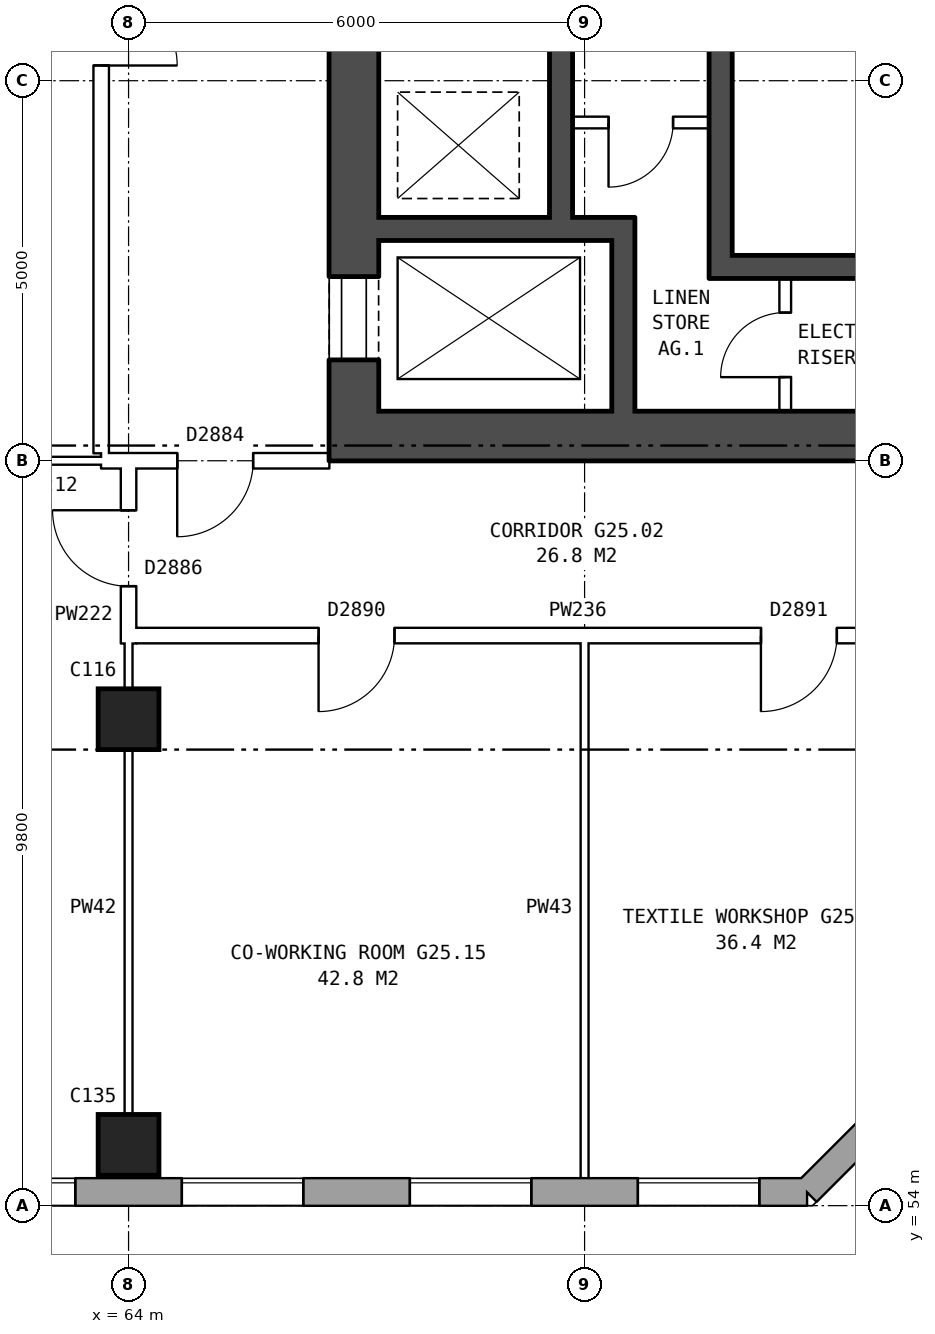
"""IFC4 building model, lengths in metres.
Left out: names, types, materials, properties, quantities, classifications, styles, units other than length and angle.
Written with IfcOpenShell. Run it as: python <this file> out.ifc"""

import sys

from ifc_helpers import new_model, si_unit, direction, frame, frame_2d, origin, origin_2d, place, context, subcontext, project, spatial, rectangle, extrude, element, fill, save


model = new_model("IFC4")
c1 = context("Model", 3, precision=1e-05, world=origin(), true_north=direction((0.0, 1.0)))
c2 = subcontext(c1, "Body", "Model", "MODEL_VIEW")
j1 = project(units=[si_unit("LENGTHUNIT", "METRE"), si_unit("PLANEANGLEUNIT", "RADIAN")], contexts=[c1])
p1 = place(None, origin())
s1 = spatial("IfcSite", under=j1, at=p1, CompositionType="ELEMENT")
p2 = place(p1, origin())
s2 = spatial("IfcBuilding", under=s1, at=p2, CompositionType="ELEMENT")
p3 = place(p2, frame((0.0, 0.0, 90.2)))
s3 = spatial("IfcBuildingStorey", under=s2, at=p3, CompositionType="ELEMENT", Elevation=90.2)
for number, where, z_axis, x_axis in (
    (1, (64.0, 54.8, 0.0), (0.0, 0.0, 1.0), (1.0, 0.0, 0.0)),
    (2, (64.0, 60.4, 0.0), (0.0, 0.0, 1.0), (1.0, 0.0, 0.0)),
):
    element("IfcColumn", number, at=place(p3, frame(where, z_axis=z_axis, x_axis=x_axis)), inside=s3, PredefinedType="COLUMN", context=c2, shape_type="SweptSolid", body=[
        extrude(rectangle(XDim=0.8, YDim=0.8, at=origin_2d()), origin(), (0.0, 0.0, 1.0), 5.6),
    ])
p4 = place(p3, frame((28.075, 54.18, 0.0), z_axis=(0.0, 0.0, 1.0), x_axis=(1.0, 0.0, 0.0)))
e3 = element("IfcWall", 3, at=p4, inside=s3, PredefinedType="STANDARD", context=c2, shape_type="SweptSolid", body=[
    extrude(rectangle(XDim=44.851, YDim=0.36, at=frame_2d((22.425, 0.0))), origin(), (0.0, 0.0, 1.0), 5.6),
])
p5 = place(p4, frame((0.625, 0.0, 0.15)))
e4 = element("IfcOpeningElement", 4, at=p5, cuts=e3, PredefinedType="OPENING", context=c2, shape_type="SweptSolid", body=[
    extrude(rectangle(XDim=1.6, YDim=2.4, at=frame_2d((0.8, 1.2))), frame((0.0, 0.19, 0.0), z_axis=(0.0, -1.0, 0.0), x_axis=(1.0, 0.0, 0.0)), (0.0, 0.0, 1.0), 0.38),
])
p6 = place(p4, frame((3.625, 0.0, 0.15)))
e5 = element("IfcOpeningElement", 5, at=p6, cuts=e3, PredefinedType="OPENING", context=c2, shape_type="SweptSolid", body=[
    extrude(rectangle(XDim=1.6, YDim=2.4, at=frame_2d((0.8, 1.2))), frame((0.0, 0.19, 0.0), z_axis=(0.0, -1.0, 0.0), x_axis=(1.0, 0.0, 0.0)), (0.0, 0.0, 1.0), 0.38),
])
p7 = place(p4, frame((6.625, 0.0, 0.15)))
e6 = element("IfcOpeningElement", 6, at=p7, cuts=e3, PredefinedType="OPENING", context=c2, shape_type="SweptSolid", body=[
    extrude(rectangle(XDim=1.6, YDim=2.4, at=frame_2d((0.8, 1.2))), frame((0.0, 0.19, 0.0), z_axis=(0.0, -1.0, 0.0), x_axis=(1.0, 0.0, 0.0)), (0.0, 0.0, 1.0), 0.38),
])
p8 = place(p4, frame((9.625, 0.0, 0.15)))
e7 = element("IfcOpeningElement", 7, at=p8, cuts=e3, PredefinedType="OPENING", context=c2, shape_type="SweptSolid", body=[
    extrude(rectangle(XDim=1.6, YDim=2.4, at=frame_2d((0.8, 1.2))), frame((0.0, 0.19, 0.0), z_axis=(0.0, -1.0, 0.0), x_axis=(1.0, 0.0, 0.0)), (0.0, 0.0, 1.0), 0.38),
])
p9 = place(p4, frame((12.625, 0.0, 0.15)))
e8 = element("IfcOpeningElement", 8, at=p9, cuts=e3, PredefinedType="OPENING", context=c2, shape_type="SweptSolid", body=[
    extrude(rectangle(XDim=1.6, YDim=2.4, at=frame_2d((0.8, 1.2))), frame((0.0, 0.19, 0.0), z_axis=(0.0, -1.0, 0.0), x_axis=(1.0, 0.0, 0.0)), (0.0, 0.0, 1.0), 0.38),
])
p10 = place(p4, frame((15.625, 0.0, 0.15)))
e9 = element("IfcOpeningElement", 9, at=p10, cuts=e3, PredefinedType="OPENING", context=c2, shape_type="SweptSolid", body=[
    extrude(rectangle(XDim=1.6, YDim=2.4, at=frame_2d((0.8, 1.2))), frame((0.0, 0.19, 0.0), z_axis=(0.0, -1.0, 0.0), x_axis=(1.0, 0.0, 0.0)), (0.0, 0.0, 1.0), 0.38),
])
p11 = place(p4, frame((18.625, 0.0, 0.15)))
e10 = element("IfcOpeningElement", 10, at=p11, cuts=e3, PredefinedType="OPENING", context=c2, shape_type="SweptSolid", body=[
    extrude(rectangle(XDim=1.6, YDim=2.4, at=frame_2d((0.8, 1.2))), frame((0.0, 0.19, 0.0), z_axis=(0.0, -1.0, 0.0), x_axis=(1.0, 0.0, 0.0)), (0.0, 0.0, 1.0), 0.38),
])
p12 = place(p4, frame((21.625, 0.0, 0.15)))
e11 = element("IfcOpeningElement", 11, at=p12, cuts=e3, PredefinedType="OPENING", context=c2, shape_type="SweptSolid", body=[
    extrude(rectangle(XDim=1.6, YDim=2.4, at=frame_2d((0.8, 1.2))), frame((0.0, 0.19, 0.0), z_axis=(0.0, -1.0, 0.0), x_axis=(1.0, 0.0, 0.0)), (0.0, 0.0, 1.0), 0.38),
])
p13 = place(p4, frame((24.625, 0.0, 0.15)))
e12 = element("IfcOpeningElement", 12, at=p13, cuts=e3, PredefinedType="OPENING", context=c2, shape_type="SweptSolid", body=[
    extrude(rectangle(XDim=1.6, YDim=2.4, at=frame_2d((0.8, 1.2))), frame((0.0, 0.19, 0.0), z_axis=(0.0, -1.0, 0.0), x_axis=(1.0, 0.0, 0.0)), (0.0, 0.0, 1.0), 0.38),
])
p14 = place(p4, frame((27.625, 0.0, 0.15)))
e13 = element("IfcOpeningElement", 13, at=p14, cuts=e3, PredefinedType="OPENING", context=c2, shape_type="SweptSolid", body=[
    extrude(rectangle(XDim=1.6, YDim=2.4, at=frame_2d((0.8, 1.2))), frame((0.0, 0.19, 0.0), z_axis=(0.0, -1.0, 0.0), x_axis=(1.0, 0.0, 0.0)), (0.0, 0.0, 1.0), 0.38),
])
p15 = place(p4, frame((30.625, 0.0, 0.15)))
e14 = element("IfcOpeningElement", 14, at=p15, cuts=e3, PredefinedType="OPENING", context=c2, shape_type="SweptSolid", body=[
    extrude(rectangle(XDim=1.6, YDim=2.4, at=frame_2d((0.8, 1.2))), frame((0.0, 0.19, 0.0), z_axis=(0.0, -1.0, 0.0), x_axis=(1.0, 0.0, 0.0)), (0.0, 0.0, 1.0), 0.38),
])
p16 = place(p4, frame((33.625, 0.0, 0.15)))
e15 = element("IfcOpeningElement", 15, at=p16, cuts=e3, PredefinedType="OPENING", context=c2, shape_type="SweptSolid", body=[
    extrude(rectangle(XDim=1.6, YDim=2.4, at=frame_2d((0.8, 1.2))), frame((0.0, 0.19, 0.0), z_axis=(0.0, -1.0, 0.0), x_axis=(1.0, 0.0, 0.0)), (0.0, 0.0, 1.0), 0.38),
])
p17 = place(p4, frame((36.625, 0.0, 0.15)))
e16 = element("IfcOpeningElement", 16, at=p17, cuts=e3, PredefinedType="OPENING", context=c2, shape_type="SweptSolid", body=[
    extrude(rectangle(XDim=1.6, YDim=2.4, at=frame_2d((0.8, 1.2))), frame((0.0, 0.19, 0.0), z_axis=(0.0, -1.0, 0.0), x_axis=(1.0, 0.0, 0.0)), (0.0, 0.0, 1.0), 0.38),
])
p18 = place(p4, frame((39.625, 0.0, 0.15)))
e17 = element("IfcOpeningElement", 17, at=p18, cuts=e3, PredefinedType="OPENING", context=c2, shape_type="SweptSolid", body=[
    extrude(rectangle(XDim=1.6, YDim=2.4, at=frame_2d((0.8, 1.2))), frame((0.0, 0.19, 0.0), z_axis=(0.0, -1.0, 0.0), x_axis=(1.0, 0.0, 0.0)), (0.0, 0.0, 1.0), 0.38),
])
p19 = place(p4, frame((42.625, 0.0, 0.15)))
e18 = element("IfcOpeningElement", 18, at=p19, cuts=e3, PredefinedType="OPENING", context=c2, shape_type="SweptSolid", body=[
    extrude(rectangle(XDim=1.6, YDim=2.4, at=frame_2d((0.8, 1.2))), frame((0.0, 0.19, 0.0), z_axis=(0.0, -1.0, 0.0), x_axis=(1.0, 0.0, 0.0)), (0.0, 0.0, 1.0), 0.38),
])
p20 = place(p3, frame((72.925, 54.18, 0.0), z_axis=(0.0, 0.0, 1.0), x_axis=(0.707106781187, 0.707106781187, 0.0)))
e19 = element("IfcWall", 19, at=p20, inside=s3, PredefinedType="STANDARD", context=c2, shape_type="SweptSolid", body=[
    extrude(rectangle(XDim=4.094, YDim=0.36, at=frame_2d((2.047, 0.0))), origin(), (0.0, 0.0, 1.0), 5.6),
])
p21 = place(p3, frame((66.965, 64.45, 0.0), z_axis=(0.0, 0.0, 1.0), x_axis=(0.0, 1.0, 0.0)))
e20 = element("IfcWall", 20, at=p21, inside=s3, PredefinedType="SHEAR", context=c2, shape_type="SweptSolid", body=[
    extrude(rectangle(XDim=11.1, YDim=0.65, at=frame_2d((5.55, 0.0))), origin(), (0.0, 0.0, 1.0), 5.6),
])
p22 = place(p21, frame((0.675, 0.0, 0.0)))
e21 = element("IfcOpeningElement", 21, at=p22, cuts=e20, PredefinedType="OPENING", context=c2, shape_type="SweptSolid", body=[
    extrude(rectangle(XDim=1.1, YDim=2.1, at=frame_2d((0.55, 1.05))), frame((0.0, 0.335, 0.0), z_axis=(0.0, -1.0, 0.0), x_axis=(1.0, 0.0, 0.0)), (0.0, 0.0, 1.0), 0.67),
])
p23 = place(p21, frame((9.25, 0.0, 0.0)))
e22 = element("IfcOpeningElement", 22, at=p23, cuts=e20, PredefinedType="OPENING", context=c2, shape_type="SweptSolid", body=[
    extrude(rectangle(XDim=1.1, YDim=2.1, at=frame_2d((0.55, 1.05))), frame((0.0, 0.335, 0.0), z_axis=(0.0, -1.0, 0.0), x_axis=(1.0, 0.0, 0.0)), (0.0, 0.0, 1.0), 0.67),
])
p24 = place(p3, frame((66.64, 64.125, 0.0), z_axis=(0.0, 0.0, 1.0), x_axis=(1.0, 0.0, 0.0)))
e23 = element("IfcWall", 23, at=p24, inside=s3, PredefinedType="SHEAR", context=c2, shape_type="SweptSolid", body=[
    extrude(rectangle(XDim=9.0, YDim=0.65, at=frame_2d((4.5, 0.0))), origin(), (0.0, 0.0, 1.0), 5.6),
])
p25 = place(p3, frame((71.94, 66.35, 0.0), z_axis=(0.0, 0.0, 1.0), x_axis=(1.0, 0.0, 0.0)))
e24 = element("IfcWall", 24, at=p25, inside=s3, PredefinedType="SHEAR", context=c2, shape_type="SweptSolid", body=[
    extrude(rectangle(XDim=3.05, YDim=0.3, at=frame_2d((1.525, 0.0))), origin(), (0.0, 0.0, 1.0), 5.6),
])
p26 = place(p3, frame((67.29, 66.85, 0.0), z_axis=(0.0, 0.0, 1.0), x_axis=(1.0, 0.0, 0.0)))
e25 = element("IfcWall", 25, at=p26, inside=s3, PredefinedType="SHEAR", context=c2, shape_type="SweptSolid", body=[
    extrude(rectangle(XDim=3.37, YDim=0.3, at=frame_2d((1.685, 0.0))), origin(), (0.0, 0.0, 1.0), 5.6),
])
p27 = place(p3, frame((69.84, 68.25, 0.0), z_axis=(0.0, 0.0, 1.0), x_axis=(1.0, 0.0, 0.0)))
e26 = element("IfcWall", 26, at=p27, inside=s3, PredefinedType="PARTITIONING", context=c2, shape_type="SweptSolid", body=[
    extrude(rectangle(XDim=1.8, YDim=0.15, at=frame_2d((0.9, 0.0))), origin(), (0.0, 0.0, 1.0), 5.6),
])
p28 = place(p27, frame((0.475, 0.0, 0.0)))
e27 = element("IfcOpeningElement", 27, at=p28, cuts=e26, PredefinedType="OPENING", context=c2, shape_type="SweptSolid", body=[
    extrude(rectangle(XDim=0.85, YDim=2.1, at=frame_2d((0.425, 1.05))), frame((0.0, 0.085, 0.0), z_axis=(0.0, -1.0, 0.0), x_axis=(1.0, 0.0, 0.0)), (0.0, 0.0, 1.0), 0.17),
])
p29 = place(p3, frame((69.69, 67.0, 0.0), z_axis=(0.0, 0.0, 1.0), x_axis=(0.0, 1.0, 0.0)))
e28 = element("IfcWall", 28, at=p29, inside=s3, PredefinedType="SHEAR", context=c2, shape_type="SweptSolid", body=[
    extrude(rectangle(XDim=6.6, YDim=0.3, at=frame_2d((3.3, 0.0))), origin(), (0.0, 0.0, 1.0), 5.6),
])
p30 = place(p3, frame((70.51, 64.45, 0.0), z_axis=(0.0, 0.0, 1.0), x_axis=(0.0, 1.0, 0.0)))
e29 = element("IfcWall", 29, at=p30, inside=s3, PredefinedType="SHEAR", context=c2, shape_type="SweptSolid", body=[
    extrude(rectangle(XDim=2.25, YDim=0.3, at=frame_2d((1.125, 0.0))), origin(), (0.0, 0.0, 1.0), 5.6),
])
p31 = place(p3, frame((71.79, 66.2, 0.0), z_axis=(0.0, 0.0, 1.0), x_axis=(0.0, 1.0, 0.0)))
e30 = element("IfcWall", 30, at=p31, inside=s3, PredefinedType="SHEAR", context=c2, shape_type="SweptSolid", body=[
    extrude(rectangle(XDim=7.4, YDim=0.3, at=frame_2d((3.7, 0.0))), origin(), (0.0, 0.0, 1.0), 5.6),
])
p32 = place(p3, frame((72.64, 64.45, 0.0), z_axis=(0.0, 0.0, 1.0), x_axis=(0.0, 1.0, 0.0)))
e31 = element("IfcWall", 31, at=p32, inside=s3, PredefinedType="PARTITIONING", context=c2, shape_type="SweptSolid", body=[
    extrude(rectangle(XDim=1.75, YDim=0.15, at=frame_2d((0.875, 0.0))), origin(), (0.0, 0.0, 1.0), 5.6),
])
p33 = place(p32, frame((0.45, 0.0, 0.0)))
e32 = element("IfcOpeningElement", 32, at=p33, cuts=e31, PredefinedType="OPENING", context=c2, shape_type="SweptSolid", body=[
    extrude(rectangle(XDim=0.85, YDim=2.1, at=frame_2d((0.425, 1.05))), frame((0.0, 0.085, 0.0), z_axis=(0.0, -1.0, 0.0), x_axis=(1.0, 0.0, 0.0)), (0.0, 0.0, 1.0), 0.17),
])
p34 = place(p3, frame((63.64, 63.9, 0.0), z_axis=(0.0, 0.0, 1.0), x_axis=(0.0, 1.0, 0.0)))
e33 = element("IfcWall", 33, at=p34, inside=s3, PredefinedType="PARTITIONING", context=c2, shape_type="SweptSolid", body=[
    extrude(rectangle(XDim=12.2, YDim=0.2, at=frame_2d((6.1, 0.0))), origin(), (0.0, 0.0, 1.0), 5.6),
])
p35 = place(p34, frame((5.1, 0.0, 0.0)))
e34 = element("IfcOpeningElement", 34, at=p35, cuts=e33, PredefinedType="OPENING", context=c2, shape_type="SweptSolid", body=[
    extrude(rectangle(XDim=2.0, YDim=2.1, at=frame_2d((1.0, 1.05))), frame((0.0, 0.11, 0.0), z_axis=(0.0, -1.0, 0.0), x_axis=(1.0, 0.0, 0.0)), (0.0, 0.0, 1.0), 0.22),
])
p36 = place(p3, frame((63.9, 61.5, 0.0), z_axis=(0.0, 0.0, 1.0), x_axis=(1.0, 0.0, 0.0)))
e35 = element("IfcWall", 35, at=p36, inside=s3, PredefinedType="PARTITIONING", context=c2, shape_type="SweptSolid", body=[
    extrude(rectangle(XDim=11.86, YDim=0.2, at=frame_2d((5.93, 0.0))), origin(), (0.0, 0.0, 1.0), 5.6),
])
p37 = place(p36, frame((2.6, 0.0, 0.0)))
e36 = element("IfcOpeningElement", 36, at=p37, cuts=e35, PredefinedType="OPENING", context=c2, shape_type="SweptSolid", body=[
    extrude(rectangle(XDim=1.0, YDim=2.1, at=frame_2d((0.5, 1.05))), frame((0.0, 0.11, 0.0), z_axis=(0.0, -1.0, 0.0), x_axis=(1.0, 0.0, 0.0)), (0.0, 0.0, 1.0), 0.22),
])
p38 = place(p36, frame((8.42, 0.0, 0.0)))
e37 = element("IfcOpeningElement", 37, at=p38, cuts=e35, PredefinedType="OPENING", context=c2, shape_type="SweptSolid", body=[
    extrude(rectangle(XDim=1.0, YDim=2.1, at=frame_2d((0.5, 1.05))), frame((0.0, 0.11, 0.0), z_axis=(0.0, -1.0, 0.0), x_axis=(1.0, 0.0, 0.0)), (0.0, 0.0, 1.0), 0.22),
])
p39 = place(p3, frame((63.64, 63.8, 0.0), z_axis=(0.0, 0.0, 1.0), x_axis=(1.0, 0.0, 0.0)))
e38 = element("IfcWall", 38, at=p39, inside=s3, PredefinedType="PARTITIONING", context=c2, shape_type="SweptSolid", body=[
    extrude(rectangle(XDim=3.0, YDim=0.2, at=frame_2d((1.5, 0.0))), origin(), (0.0, 0.0, 1.0), 5.6),
])
p40 = place(p39, frame((1.0, 0.0, 0.0)))
e39 = element("IfcOpeningElement", 39, at=p40, cuts=e38, PredefinedType="OPENING", context=c2, shape_type="SweptSolid", body=[
    extrude(rectangle(XDim=1.0, YDim=2.1, at=frame_2d((0.5, 1.05))), frame((0.0, 0.11, 0.0), z_axis=(0.0, -1.0, 0.0), x_axis=(1.0, 0.0, 0.0)), (0.0, 0.0, 1.0), 0.22),
])
p41 = place(p3, frame((44.26, 63.8, 0.0), z_axis=(0.0, 0.0, 1.0), x_axis=(1.0, 0.0, 0.0)))
e40 = element("IfcWall", 40, at=p41, inside=s3, PredefinedType="PARTITIONING", context=c2, shape_type="SweptSolid", body=[
    extrude(rectangle(XDim=19.38, YDim=0.1, at=frame_2d((9.69, 0.0))), origin(), (0.0, 0.0, 1.0), 5.6),
])
p42 = place(p41, frame((4.42, 0.0, 0.0)))
e41 = element("IfcOpeningElement", 41, at=p42, cuts=e40, PredefinedType="OPENING", context=c2, shape_type="SweptSolid", body=[
    extrude(rectangle(XDim=1.0, YDim=2.1, at=frame_2d((0.5, 1.05))), frame((0.0, 0.06, 0.0), z_axis=(0.0, -1.0, 0.0), x_axis=(1.0, 0.0, 0.0)), (0.0, 0.0, 1.0), 0.12),
])
p43 = place(p41, frame((14.06, 0.0, 0.0)))
e42 = element("IfcOpeningElement", 42, at=p43, cuts=e40, PredefinedType="OPENING", context=c2, shape_type="SweptSolid", body=[
    extrude(rectangle(XDim=1.0, YDim=2.1, at=frame_2d((0.5, 1.05))), frame((0.0, 0.06, 0.0), z_axis=(0.0, -1.0, 0.0), x_axis=(1.0, 0.0, 0.0)), (0.0, 0.0, 1.0), 0.12),
])
p44 = place(p3, frame((64.0, 61.398, 0.0), z_axis=(0.0, 0.0, 1.0), x_axis=(0.0, 1.0, 0.0)))
e43 = element("IfcWall", 43, at=p44, inside=s3, PredefinedType="PARTITIONING", context=c2, shape_type="SweptSolid", body=[
    extrude(rectangle(XDim=2.502, YDim=0.2, at=frame_2d((1.251, 0.0))), origin(), (0.0, 0.0, 1.0), 5.6),
])
p45 = place(p44, frame((0.751, 0.0, 0.0)))
e44 = element("IfcOpeningElement", 44, at=p45, cuts=e43, PredefinedType="OPENING", context=c2, shape_type="SweptSolid", body=[
    extrude(rectangle(XDim=1.0, YDim=2.1, at=frame_2d((0.5, 1.05))), frame((0.0, 0.11, 0.0), z_axis=(0.0, -1.0, 0.0), x_axis=(1.0, 0.0, 0.0)), (0.0, 0.0, 1.0), 0.22),
])
p46 = place(p3, frame((64.0, 54.24, 0.0), z_axis=(0.0, 0.0, 1.0), x_axis=(0.0, 1.0, 0.0)))
e45 = element("IfcWall", 45, at=p46, inside=s3, PredefinedType="PARTITIONING", context=c2, shape_type="SweptSolid", body=[
    extrude(rectangle(XDim=7.362, YDim=0.1, at=frame_2d((3.681, 0.0))), origin(), (0.0, 0.0, 1.0), 5.6),
])
p47 = place(p3, frame((70.0, 54.24, 0.0), z_axis=(0.0, 0.0, 1.0), x_axis=(0.0, 1.0, 0.0)))
e46 = element("IfcWall", 46, at=p47, inside=s3, PredefinedType="PARTITIONING", context=c2, shape_type="SweptSolid", body=[
    extrude(rectangle(XDim=7.36, YDim=0.1, at=frame_2d((3.68, 0.0))), origin(), (0.0, 0.0, 1.0), 5.6),
])
p48 = place(p16, origin())
e47 = element("IfcWindow", 47, at=p48, inside=s3, PartitioningType="SINGLE_PANEL", PredefinedType="WINDOW", context=c2, shape_type="SweptSolid", body=[
    extrude(rectangle(XDim=1.6, YDim=2.4, at=frame_2d((0.8, 1.2))), frame((0.0, 0.15, 0.0), z_axis=(0.0, -1.0, 0.0), x_axis=(1.0, 0.0, 0.0)), (0.0, 0.0, 1.0), 0.06),
])
fill(e15, e47)
p49 = place(p17, origin())
e48 = element("IfcWindow", 48, at=p49, inside=s3, PartitioningType="SINGLE_PANEL", PredefinedType="WINDOW", context=c2, shape_type="SweptSolid", body=[
    extrude(rectangle(XDim=1.6, YDim=2.4, at=frame_2d((0.8, 1.2))), frame((0.0, 0.15, 0.0), z_axis=(0.0, -1.0, 0.0), x_axis=(1.0, 0.0, 0.0)), (0.0, 0.0, 1.0), 0.06),
])
fill(e16, e48)
p50 = place(p18, origin())
e49 = element("IfcWindow", 49, at=p50, inside=s3, PartitioningType="SINGLE_PANEL", PredefinedType="WINDOW", context=c2, shape_type="SweptSolid", body=[
    extrude(rectangle(XDim=1.6, YDim=2.4, at=frame_2d((0.8, 1.2))), frame((0.0, 0.15, 0.0), z_axis=(0.0, -1.0, 0.0), x_axis=(1.0, 0.0, 0.0)), (0.0, 0.0, 1.0), 0.06),
])
fill(e17, e49)
p51 = place(p19, origin())
e50 = element("IfcWindow", 50, at=p51, inside=s3, PartitioningType="SINGLE_PANEL", PredefinedType="WINDOW", context=c2, shape_type="SweptSolid", body=[
    extrude(rectangle(XDim=1.6, YDim=2.4, at=frame_2d((0.8, 1.2))), frame((0.0, 0.15, 0.0), z_axis=(0.0, -1.0, 0.0), x_axis=(1.0, 0.0, 0.0)), (0.0, 0.0, 1.0), 0.06),
])
fill(e18, e50)
p52 = place(p22, origin())
e51 = element("IfcDoor", 51, at=p52, inside=s3, OperationType="DOUBLE_DOOR_SLIDING", PredefinedType="DOOR", context=c2, shape_type="SweptSolid", body=[
    extrude(rectangle(XDim=1.1, YDim=2.1, at=frame_2d((0.55, 1.05))), frame((0.0, -0.26, 0.0), z_axis=(0.0, -1.0, 0.0), x_axis=(1.0, 0.0, 0.0)), (0.0, 0.0, 1.0), 0.05),
])
fill(e21, e51)
p53 = place(p28, frame((0.85, 0.0, 0.0), z_axis=(0.0, 0.0, 1.0), x_axis=(-1.0, 0.0, 0.0)))
e52 = element("IfcDoor", 52, at=p53, inside=s3, OperationType="SINGLE_SWING_RIGHT", PredefinedType="DOOR", context=c2, shape_type="SweptSolid", body=[
    extrude(rectangle(XDim=0.85, YDim=2.1, at=frame_2d((0.425, 1.05))), frame((0.0, 0.025, 0.0), z_axis=(0.0, -1.0, 0.0), x_axis=(1.0, 0.0, 0.0)), (0.0, 0.0, 1.0), 0.05),
])
fill(e27, e52)
p54 = place(p33, origin())
e53 = element("IfcDoor", 53, at=p54, inside=s3, OperationType="SINGLE_SWING_LEFT", PredefinedType="DOOR", context=c2, shape_type="SweptSolid", body=[
    extrude(rectangle(XDim=0.85, YDim=2.1, at=frame_2d((0.425, 1.05))), frame((0.0, 0.025, 0.0), z_axis=(0.0, -1.0, 0.0), x_axis=(1.0, 0.0, 0.0)), (0.0, 0.0, 1.0), 0.05),
])
fill(e32, e53)
p55 = place(p35, frame((2.0, 0.0, 0.0), z_axis=(0.0, 0.0, 1.0), x_axis=(-1.0, 0.0, 0.0)))
e54 = element("IfcDoor", 54, at=p55, inside=s3, OperationType="DOUBLE_DOOR_SINGLE_SWING", PredefinedType="DOOR", context=c2, shape_type="SweptSolid", body=[
    extrude(rectangle(XDim=2.0, YDim=2.1, at=frame_2d((1.0, 1.05))), frame((0.0, 0.025, 0.0), z_axis=(0.0, -1.0, 0.0), x_axis=(1.0, 0.0, 0.0)), (0.0, 0.0, 1.0), 0.05),
])
fill(e34, e54)
p56 = place(p37, frame((1.0, 0.0, 0.0), z_axis=(0.0, 0.0, 1.0), x_axis=(-1.0, 0.0, 0.0)))
e55 = element("IfcDoor", 55, at=p56, inside=s3, OperationType="SINGLE_SWING_RIGHT", PredefinedType="DOOR", context=c2, shape_type="SweptSolid", body=[
    extrude(rectangle(XDim=1.0, YDim=2.1, at=frame_2d((0.5, 1.05))), frame((0.0, 0.025, 0.0), z_axis=(0.0, -1.0, 0.0), x_axis=(1.0, 0.0, 0.0)), (0.0, 0.0, 1.0), 0.05),
])
fill(e36, e55)
p57 = place(p38, frame((1.0, 0.0, 0.0), z_axis=(0.0, 0.0, 1.0), x_axis=(-1.0, 0.0, 0.0)))
e56 = element("IfcDoor", 56, at=p57, inside=s3, OperationType="SINGLE_SWING_RIGHT", PredefinedType="DOOR", context=c2, shape_type="SweptSolid", body=[
    extrude(rectangle(XDim=1.0, YDim=2.1, at=frame_2d((0.5, 1.05))), frame((0.0, 0.025, 0.0), z_axis=(0.0, -1.0, 0.0), x_axis=(1.0, 0.0, 0.0)), (0.0, 0.0, 1.0), 0.05),
])
fill(e37, e56)
p58 = place(p40, frame((1.0, 0.0, 0.0), z_axis=(0.0, 0.0, 1.0), x_axis=(-1.0, 0.0, 0.0)))
e57 = element("IfcDoor", 57, at=p58, inside=s3, OperationType="SINGLE_SWING_RIGHT", PredefinedType="DOOR", context=c2, shape_type="SweptSolid", body=[
    extrude(rectangle(XDim=1.0, YDim=2.1, at=frame_2d((0.5, 1.05))), frame((0.0, 0.025, 0.0), z_axis=(0.0, -1.0, 0.0), x_axis=(1.0, 0.0, 0.0)), (0.0, 0.0, 1.0), 0.05),
])
fill(e39, e57)
p59 = place(p45, origin())
e58 = element("IfcDoor", 58, at=p59, inside=s3, OperationType="SINGLE_SWING_RIGHT", PredefinedType="DOOR", context=c2, shape_type="SweptSolid", body=[
    extrude(rectangle(XDim=1.0, YDim=2.1, at=frame_2d((0.5, 1.05))), frame((0.0, 0.025, 0.0), z_axis=(0.0, -1.0, 0.0), x_axis=(1.0, 0.0, 0.0)), (0.0, 0.0, 1.0), 0.05),
])
fill(e44, e58)
save(model, sys.argv[1])
